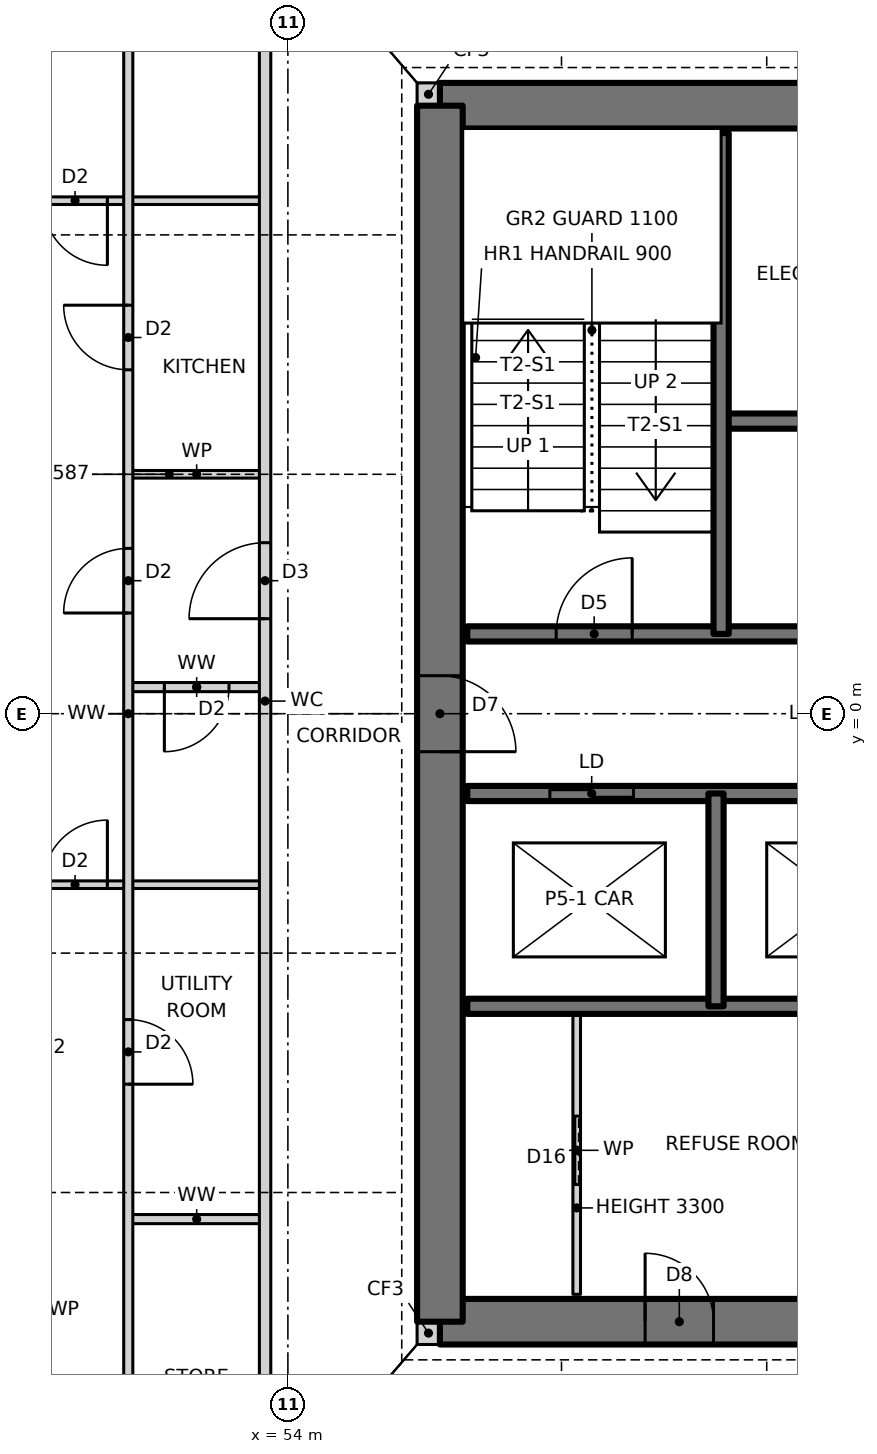
"""IFC4 building model, lengths in metres.
Left out: names, types, materials, properties, quantities, classifications, styles, units other than length and angle.
Written with IfcOpenShell. Run it as: python <this file> out.ifc"""

import sys

from ifc_helpers import new_model, si_unit, direction, frame, frame_2d, origin, place, context, subcontext, project, spatial, rectangle, extrude, element, fill, save


model = new_model("IFC4")
c1 = context("Model", 3, precision=1e-05, world=origin(), true_north=direction((0.0, 1.0)))
c2 = subcontext(c1, "Body", "Model", "MODEL_VIEW")
j1 = project(units=[si_unit("LENGTHUNIT", "METRE"), si_unit("PLANEANGLEUNIT", "RADIAN")], contexts=[c1])
p1 = place(None, origin())
s1 = spatial("IfcSite", under=j1, at=p1, CompositionType="ELEMENT")
p2 = place(p1, origin())
s2 = spatial("IfcBuilding", under=s1, at=p2, CompositionType="ELEMENT")
p3 = place(p2, frame((0.0, 0.0, 39.5)))
s3 = spatial("IfcBuildingStorey", under=s2, at=p3, CompositionType="ELEMENT", Elevation=39.5)
for number, where, z_axis, x_axis in (
    (1, (55.7, -8.15, 0.0), (0.0, 0.0, 1.0), (1.0, 0.0, 0.0)),
    (2, (55.7, 8.15, 0.0), (0.0, 0.0, 1.0), (1.0, 0.0, 0.0)),
):
    element("IfcWall", number, at=place(p3, frame(where, z_axis=z_axis, x_axis=x_axis)), inside=s3, PredefinedType="SOLIDWALL", context=c2, shape_type="SweptSolid", body=[
        extrude(rectangle(XDim=0.3, YDim=0.3, at=frame_2d((0.15, 0.0))), origin(), (0.0, 0.0, 1.0), 3.5),
    ])
p4 = place(p3, frame((56.0, -8.0, 0.0), z_axis=(0.0, 0.0, 1.0), x_axis=(1.0, 0.0, 0.0)))
e3 = element("IfcWall", 3, at=p4, inside=s3, PredefinedType="SHEAR", context=c2, shape_type="SweptSolid", body=[
    extrude(rectangle(XDim=14.0, YDim=0.6, at=frame_2d((7.0, 0.0))), origin(), (0.0, 0.0, 1.0), 3.5),
])
p5 = place(p4, frame((2.7, 0.0, 0.0)))
e4 = element("IfcOpeningElement", 4, at=p5, cuts=e3, PredefinedType="OPENING", context=c2, shape_type="SweptSolid", body=[
    extrude(rectangle(XDim=0.9, YDim=2.1, at=frame_2d((0.45, 1.05))), frame((0.0, 0.31, 0.0), z_axis=(0.0, -1.0, 0.0), x_axis=(1.0, 0.0, 0.0)), (0.0, 0.0, 1.0), 0.62),
])
p6 = place(p4, frame((7.7, 0.0, 0.0)))
e5 = element("IfcOpeningElement", 5, at=p6, cuts=e3, PredefinedType="OPENING", context=c2, shape_type="SweptSolid", body=[
    extrude(rectangle(XDim=0.9, YDim=2.1, at=frame_2d((0.45, 1.05))), frame((0.0, 0.31, 0.0), z_axis=(0.0, -1.0, 0.0), x_axis=(1.0, 0.0, 0.0)), (0.0, 0.0, 1.0), 0.62),
])
p7 = place(p3, frame((70.0, 8.0, 0.0), z_axis=(0.0, 0.0, 1.0), x_axis=(-1.0, 0.0, 0.0)))
e6 = element("IfcWall", 6, at=p7, inside=s3, PredefinedType="SHEAR", context=c2, shape_type="SweptSolid", body=[
    extrude(rectangle(XDim=14.0, YDim=0.6, at=frame_2d((7.0, 0.0))), origin(), (0.0, 0.0, 1.0), 3.5),
])
p8 = place(p7, frame((8.2, 0.0, 0.0)))
e7 = element("IfcOpeningElement", 7, at=p8, cuts=e6, PredefinedType="OPENING", context=c2, shape_type="SweptSolid", body=[
    extrude(rectangle(XDim=0.9, YDim=2.1, at=frame_2d((0.45, 1.05))), frame((0.0, 0.31, 0.0), z_axis=(0.0, -1.0, 0.0), x_axis=(1.0, 0.0, 0.0)), (0.0, 0.0, 1.0), 0.62),
])
p9 = place(p7, frame((3.2, 0.0, 0.0)))
e8 = element("IfcOpeningElement", 8, at=p9, cuts=e6, PredefinedType="OPENING", context=c2, shape_type="SweptSolid", body=[
    extrude(rectangle(XDim=0.9, YDim=2.1, at=frame_2d((0.45, 1.05))), frame((0.0, 0.31, 0.0), z_axis=(0.0, -1.0, 0.0), x_axis=(1.0, 0.0, 0.0)), (0.0, 0.0, 1.0), 0.62),
])
p10 = place(p3, frame((56.0, 8.0, 0.0), z_axis=(0.0, 0.0, 1.0), x_axis=(0.0, -1.0, 0.0)))
e9 = element("IfcWall", 9, at=p10, inside=s3, PredefinedType="SHEAR", context=c2, shape_type="SweptSolid", body=[
    extrude(rectangle(XDim=16.0, YDim=0.6, at=frame_2d((8.0, 0.0))), origin(), (0.0, 0.0, 1.0), 3.5),
])
p11 = place(p10, frame((7.5, 0.0, 0.0)))
e10 = element("IfcOpeningElement", 10, at=p11, cuts=e9, PredefinedType="OPENING", context=c2, shape_type="SweptSolid", body=[
    extrude(rectangle(XDim=1.0, YDim=2.1, at=frame_2d((0.5, 1.05))), frame((0.0, 0.31, 0.0), z_axis=(0.0, -1.0, 0.0), x_axis=(1.0, 0.0, 0.0)), (0.0, 0.0, 1.0), 0.62),
])
p12 = place(p3, frame((51.9, -6.65, 0.0), z_axis=(0.0, 0.0, 1.0), x_axis=(1.0, 0.0, 0.0)))
e11 = element("IfcWall", 11, at=p12, inside=s3, PredefinedType="PARTITIONING", context=c2, shape_type="SweptSolid", body=[
    extrude(rectangle(XDim=1.8, YDim=0.12, at=frame_2d((0.9, 0.0))), origin(), (0.0, 0.0, 1.0), 3.27),
])
p13 = place(p3, frame((56.36, -3.85, 0.0), z_axis=(0.0, 0.0, 1.0), x_axis=(1.0, 0.0, 0.0)))
e12 = element("IfcWall", 12, at=p13, inside=s3, PredefinedType="SOLIDWALL", context=c2, shape_type="SweptSolid", body=[
    extrude(rectangle(XDim=9.94, YDim=0.2, at=frame_2d((4.97, 0.0))), origin(), (0.0, 0.0, 1.0), 3.5),
])
p14 = place(p3, frame((46.56, -2.25, 0.0), z_axis=(0.0, 0.0, 1.0), x_axis=(1.0, 0.0, 0.0)))
e13 = element("IfcWall", 13, at=p14, inside=s3, PredefinedType="PARTITIONING", context=c2, shape_type="SweptSolid", body=[
    extrude(rectangle(XDim=7.14, YDim=0.1, at=frame_2d((3.57, 0.0))), origin(), (0.0, 0.0, 1.0), 3.27),
])
p15 = place(p14, frame((4.215, 0.0, 0.0)))
e14 = element("IfcOpeningElement", 14, at=p15, cuts=e13, PredefinedType="OPENING", context=c2, shape_type="SweptSolid", body=[
    extrude(rectangle(XDim=0.85, YDim=2.1, at=frame_2d((0.425, 1.05))), frame((0.0, 0.06, 0.0), z_axis=(0.0, -1.0, 0.0), x_axis=(1.0, 0.0, 0.0)), (0.0, 0.0, 1.0), 0.12),
])
p16 = place(p3, frame((56.36, -1.05, 0.0), z_axis=(0.0, 0.0, 1.0), x_axis=(1.0, 0.0, 0.0)))
e15 = element("IfcWall", 15, at=p16, inside=s3, PredefinedType="SOLIDWALL", context=c2, shape_type="SweptSolid", body=[
    extrude(rectangle(XDim=13.28, YDim=0.2, at=frame_2d((6.64, 0.0))), origin(), (0.0, 0.0, 1.0), 3.5),
])
p17 = place(p16, frame((11.11, 0.0, 0.0)))
e16 = element("IfcOpeningElement", 16, at=p17, cuts=e15, PredefinedType="OPENING", context=c2, shape_type="SweptSolid", body=[
    extrude(rectangle(XDim=1.0, YDim=2.1, at=frame_2d((0.5, 1.05))), frame((0.0, 0.11, 0.0), z_axis=(0.0, -1.0, 0.0), x_axis=(1.0, 0.0, 0.0)), (0.0, 0.0, 1.0), 0.22),
])
p18 = place(p16, frame((1.087, 0.0, 0.0)))
e17 = element("IfcOpeningElement", 17, at=p18, cuts=e15, PredefinedType="OPENING", context=c2, shape_type="SweptSolid", body=[
    extrude(rectangle(XDim=1.1, YDim=2.1, at=frame_2d((0.55, 1.05))), frame((0.0, 0.11, 0.0), z_axis=(0.0, -1.0, 0.0), x_axis=(1.0, 0.0, 0.0)), (0.0, 0.0, 1.0), 0.22),
])
p19 = place(p16, frame((4.39, 0.0, 0.0)))
e18 = element("IfcOpeningElement", 18, at=p19, cuts=e15, PredefinedType="OPENING", context=c2, shape_type="SweptSolid", body=[
    extrude(rectangle(XDim=1.1, YDim=2.1, at=frame_2d((0.55, 1.05))), frame((0.0, 0.11, 0.0), z_axis=(0.0, -1.0, 0.0), x_axis=(1.0, 0.0, 0.0)), (0.0, 0.0, 1.0), 0.22),
])
p20 = place(p16, frame((7.724, 0.0, 0.0)))
e19 = element("IfcOpeningElement", 19, at=p20, cuts=e15, PredefinedType="OPENING", context=c2, shape_type="SweptSolid", body=[
    extrude(rectangle(XDim=1.1, YDim=2.1, at=frame_2d((0.55, 1.05))), frame((0.0, 0.11, 0.0), z_axis=(0.0, -1.0, 0.0), x_axis=(1.0, 0.0, 0.0)), (0.0, 0.0, 1.0), 0.22),
])
p21 = place(p3, frame((51.9, 0.35, 0.0), z_axis=(0.0, 0.0, 1.0), x_axis=(1.0, 0.0, 0.0)))
e20 = element("IfcWall", 20, at=p21, inside=s3, PredefinedType="PARTITIONING", context=c2, shape_type="SweptSolid", body=[
    extrude(rectangle(XDim=1.8, YDim=0.12, at=frame_2d((0.9, 0.0))), origin(), (0.0, 0.0, 1.0), 3.27),
])
p22 = place(p21, frame((0.475, 0.0, 0.0)))
e21 = element("IfcOpeningElement", 21, at=p22, cuts=e20, PredefinedType="OPENING", context=c2, shape_type="SweptSolid", body=[
    extrude(rectangle(XDim=0.85, YDim=2.1, at=frame_2d((0.425, 1.05))), frame((0.0, 0.07, 0.0), z_axis=(0.0, -1.0, 0.0), x_axis=(1.0, 0.0, 0.0)), (0.0, 0.0, 1.0), 0.14),
])
p23 = place(p3, frame((56.36, 1.05, 0.0), z_axis=(0.0, 0.0, 1.0), x_axis=(1.0, 0.0, 0.0)))
e22 = element("IfcWall", 22, at=p23, inside=s3, PredefinedType="SOLIDWALL", context=c2, shape_type="SweptSolid", body=[
    extrude(rectangle(XDim=13.28, YDim=0.2, at=frame_2d((6.64, 0.0))), origin(), (0.0, 0.0, 1.0), 3.5),
])
p24 = place(p23, frame((1.17, 0.0, 0.0)))
e23 = element("IfcOpeningElement", 23, at=p24, cuts=e22, PredefinedType="OPENING", context=c2, shape_type="SweptSolid", body=[
    extrude(rectangle(XDim=1.0, YDim=2.1, at=frame_2d((0.5, 1.05))), frame((0.0, 0.11, 0.0), z_axis=(0.0, -1.0, 0.0), x_axis=(1.0, 0.0, 0.0)), (0.0, 0.0, 1.0), 0.22),
])
p25 = place(p23, frame((6.19, 0.0, 0.0)))
e24 = element("IfcOpeningElement", 24, at=p25, cuts=e22, PredefinedType="OPENING", context=c2, shape_type="SweptSolid", body=[
    extrude(rectangle(XDim=0.9, YDim=2.1, at=frame_2d((0.45, 1.05))), frame((0.0, 0.11, 0.0), z_axis=(0.0, -1.0, 0.0), x_axis=(1.0, 0.0, 0.0)), (0.0, 0.0, 1.0), 0.22),
])
p26 = place(p23, frame((10.96, 0.0, 0.0)))
e25 = element("IfcOpeningElement", 25, at=p26, cuts=e22, PredefinedType="OPENING", context=c2, shape_type="SweptSolid", body=[
    extrude(rectangle(XDim=1.3, YDim=2.1, at=frame_2d((0.65, 1.05))), frame((0.0, 0.11, 0.0), z_axis=(0.0, -1.0, 0.0), x_axis=(1.0, 0.0, 0.0)), (0.0, 0.0, 1.0), 0.22),
])
p27 = place(p3, frame((51.9, 3.15, 0.0), z_axis=(0.0, 0.0, 1.0), x_axis=(1.0, 0.0, 0.0)))
e26 = element("IfcWall", 26, at=p27, inside=s3, PredefinedType="PARTITIONING", context=c2, shape_type="SweptSolid", body=[
    extrude(rectangle(XDim=1.8, YDim=0.1, at=frame_2d((0.9, 0.0))), origin(), (0.0, 0.0, 1.0), 2.587),
])
p28 = place(p3, frame((59.7, 3.85, 0.0), z_axis=(0.0, 0.0, 1.0), x_axis=(1.0, 0.0, 0.0)))
e27 = element("IfcWall", 27, at=p28, inside=s3, PredefinedType="SOLIDWALL", context=c2, shape_type="SweptSolid", body=[
    extrude(rectangle(XDim=9.94, YDim=0.2, at=frame_2d((4.97, 0.0))), origin(), (0.0, 0.0, 1.0), 3.5),
])
p29 = place(p3, frame((46.56, 6.75, 0.0), z_axis=(0.0, 0.0, 1.0), x_axis=(1.0, 0.0, 0.0)))
e28 = element("IfcWall", 28, at=p29, inside=s3, PredefinedType="PARTITIONING", context=c2, shape_type="SweptSolid", body=[
    extrude(rectangle(XDim=7.14, YDim=0.1, at=frame_2d((3.57, 0.0))), origin(), (0.0, 0.0, 1.0), 3.27),
])
p30 = place(p29, frame((4.215, 0.0, 0.0)))
e29 = element("IfcOpeningElement", 29, at=p30, cuts=e28, PredefinedType="OPENING", context=c2, shape_type="SweptSolid", body=[
    extrude(rectangle(XDim=0.85, YDim=2.1, at=frame_2d((0.425, 1.05))), frame((0.0, 0.06, 0.0), z_axis=(0.0, -1.0, 0.0), x_axis=(1.0, 0.0, 0.0)), (0.0, 0.0, 1.0), 0.12),
])
p31 = place(p3, frame((59.7, 1.05, 0.0), z_axis=(0.0, 0.0, 1.0), x_axis=(0.0, 1.0, 0.0)))
e30 = element("IfcWall", 30, at=p31, inside=s3, PredefinedType="SOLIDWALL", context=c2, shape_type="SweptSolid", body=[
    extrude(rectangle(XDim=6.59, YDim=0.2, at=frame_2d((3.295, 0.0))), origin(), (0.0, 0.0, 1.0), 3.5),
])
p32 = place(p3, frame((59.633, -3.85, 0.0), z_axis=(0.0, 0.0, 1.0), x_axis=(0.0, 1.0, 0.0)))
e31 = element("IfcWall", 31, at=p32, inside=s3, PredefinedType="SOLIDWALL", context=c2, shape_type="SweptSolid", body=[
    extrude(rectangle(XDim=2.8, YDim=0.2, at=frame_2d((1.4, 0.0))), origin(), (0.0, 0.0, 1.0), 3.5),
])
p33 = place(p3, frame((57.8, -7.64, 0.0), z_axis=(0.0, 0.0, 1.0), x_axis=(0.0, 1.0, 0.0)))
e32 = element("IfcWall", 32, at=p33, inside=s3, PredefinedType="PARTITIONING", context=c2, shape_type="SweptSolid", body=[
    extrude(rectangle(XDim=3.79, YDim=0.1, at=frame_2d((1.895, 0.0))), origin(), (0.0, 0.0, 1.0), 3.3),
])
p34 = place(p33, frame((1.445, 0.0, 0.0)))
e33 = element("IfcOpeningElement", 33, at=p34, cuts=e32, PredefinedType="OPENING", context=c2, shape_type="SweptSolid", body=[
    extrude(rectangle(XDim=0.9, YDim=2.1, at=frame_2d((0.45, 1.05))), frame((0.0, 0.06, 0.0), z_axis=(0.0, -1.0, 0.0), x_axis=(1.0, 0.0, 0.0)), (0.0, 0.0, 1.0), 0.12),
])
p35 = place(p3, frame((53.7, -10.568, 0.0), z_axis=(0.0, 0.0, 1.0), x_axis=(0.0, 1.0, 0.0)))
e34 = element("IfcWall", 34, at=p35, inside=s3, PredefinedType="PARTITIONING", context=c2, shape_type="SweptSolid", body=[
    extrude(rectangle(XDim=21.468, YDim=0.15, at=frame_2d((10.734, 0.0))), origin(), (0.0, 0.0, 1.0), 3.27),
])
p36 = place(p35, frame((11.818, 0.0, 0.0)))
e35 = element("IfcOpeningElement", 35, at=p36, cuts=e34, PredefinedType="OPENING", context=c2, shape_type="SweptSolid", body=[
    extrude(rectangle(XDim=1.0, YDim=2.1, at=frame_2d((0.5, 1.05))), frame((0.0, 0.085, 0.0), z_axis=(0.0, -1.0, 0.0), x_axis=(1.0, 0.0, 0.0)), (0.0, 0.0, 1.0), 0.17),
])
p37 = place(p3, frame((51.9, -12.614, 0.0), z_axis=(0.0, 0.0, 1.0), x_axis=(0.0, 1.0, 0.0)))
e36 = element("IfcWall", 36, at=p37, inside=s3, PredefinedType="PARTITIONING", context=c2, shape_type="SweptSolid", body=[
    extrude(rectangle(XDim=25.228, YDim=0.12, at=frame_2d((12.614, 0.0))), origin(), (0.0, 0.0, 1.0), 3.27),
])
p38 = place(p37, frame((17.139, 0.0, 0.0)))
e37 = element("IfcOpeningElement", 37, at=p38, cuts=e36, PredefinedType="OPENING", context=c2, shape_type="SweptSolid", body=[
    extrude(rectangle(XDim=0.85, YDim=2.1, at=frame_2d((0.425, 1.05))), frame((0.0, 0.07, 0.0), z_axis=(0.0, -1.0, 0.0), x_axis=(1.0, 0.0, 0.0)), (0.0, 0.0, 1.0), 0.14),
])
p39 = place(p37, frame((13.939, 0.0, 0.0)))
e38 = element("IfcOpeningElement", 38, at=p39, cuts=e36, PredefinedType="OPENING", context=c2, shape_type="SweptSolid", body=[
    extrude(rectangle(XDim=0.85, YDim=2.1, at=frame_2d((0.425, 1.05))), frame((0.0, 0.07, 0.0), z_axis=(0.0, -1.0, 0.0), x_axis=(1.0, 0.0, 0.0)), (0.0, 0.0, 1.0), 0.14),
])
p40 = place(p37, frame((21.871, 0.0, 0.0)))
e39 = element("IfcOpeningElement", 39, at=p40, cuts=e36, PredefinedType="OPENING", context=c2, shape_type="SweptSolid", body=[
    extrude(rectangle(XDim=0.85, YDim=2.1, at=frame_2d((0.425, 1.05))), frame((0.0, 0.07, 0.0), z_axis=(0.0, -1.0, 0.0), x_axis=(1.0, 0.0, 0.0)), (0.0, 0.0, 1.0), 0.14),
])
p41 = place(p37, frame((7.739, 0.0, 0.0)))
e40 = element("IfcOpeningElement", 40, at=p41, cuts=e36, PredefinedType="OPENING", context=c2, shape_type="SweptSolid", body=[
    extrude(rectangle(XDim=0.85, YDim=2.1, at=frame_2d((0.425, 1.05))), frame((0.0, 0.07, 0.0), z_axis=(0.0, -1.0, 0.0), x_axis=(1.0, 0.0, 0.0)), (0.0, 0.0, 1.0), 0.14),
])
p42 = place(p37, frame((2.557, 0.0, 0.0)))
e41 = element("IfcOpeningElement", 41, at=p42, cuts=e36, PredefinedType="OPENING", context=c2, shape_type="SweptSolid", body=[
    extrude(rectangle(XDim=0.85, YDim=2.1, at=frame_2d((0.425, 1.05))), frame((0.0, 0.07, 0.0), z_axis=(0.0, -1.0, 0.0), x_axis=(1.0, 0.0, 0.0)), (0.0, 0.0, 1.0), 0.14),
])
p43 = place(p24, origin())
e42 = element("IfcDoor", 42, at=p43, inside=s3, OperationType="SINGLE_SWING_RIGHT", PredefinedType="DOOR", context=c2, shape_type="SweptSolid", body=[
    extrude(rectangle(XDim=1.0, YDim=2.1, at=frame_2d((0.5, 1.05))), frame((0.0, 0.025, 0.0), z_axis=(0.0, -1.0, 0.0), x_axis=(1.0, 0.0, 0.0)), (0.0, 0.0, 1.0), 0.05),
])
fill(e23, e42)
p44 = place(p34, origin())
e43 = element("IfcDoor", 43, at=p44, inside=s3, OperationType="SLIDING_TO_LEFT", PredefinedType="DOOR", context=c2, shape_type="SweptSolid", body=[
    extrude(rectangle(XDim=0.9, YDim=2.1, at=frame_2d((0.45, 1.05))), frame((0.0, 0.025, 0.0), z_axis=(0.0, -1.0, 0.0), x_axis=(1.0, 0.0, 0.0)), (0.0, 0.0, 1.0), 0.05),
])
fill(e33, e43)
p45 = place(p38, origin())
e44 = element("IfcDoor", 44, at=p45, inside=s3, OperationType="SINGLE_SWING_RIGHT", PredefinedType="DOOR", context=c2, shape_type="SweptSolid", body=[
    extrude(rectangle(XDim=0.85, YDim=2.1, at=frame_2d((0.425, 1.05))), frame((0.0, 0.025, 0.0), z_axis=(0.0, -1.0, 0.0), x_axis=(1.0, 0.0, 0.0)), (0.0, 0.0, 1.0), 0.05),
])
fill(e37, e44)
p46 = place(p36, origin())
e45 = element("IfcDoor", 45, at=p46, inside=s3, OperationType="SINGLE_SWING_LEFT", PredefinedType="DOOR", context=c2, shape_type="SweptSolid", body=[
    extrude(rectangle(XDim=1.0, YDim=2.1, at=frame_2d((0.5, 1.05))), frame((0.0, 0.025, 0.0), z_axis=(0.0, -1.0, 0.0), x_axis=(1.0, 0.0, 0.0)), (0.0, 0.0, 1.0), 0.05),
])
fill(e35, e45)
p47 = place(p39, origin())
e46 = element("IfcDoor", 46, at=p47, inside=s3, OperationType="SINGLE_SWING_LEFT", PredefinedType="DOOR", context=c2, shape_type="SweptSolid", body=[
    extrude(rectangle(XDim=0.85, YDim=2.1, at=frame_2d((0.425, 1.05))), frame((0.0, 0.025, 0.0), z_axis=(0.0, -1.0, 0.0), x_axis=(1.0, 0.0, 0.0)), (0.0, 0.0, 1.0), 0.05),
])
fill(e38, e46)
p48 = place(p22, frame((0.85, 0.0, 0.0), z_axis=(0.0, 0.0, 1.0), x_axis=(-1.0, 0.0, 0.0)))
e47 = element("IfcDoor", 47, at=p48, inside=s3, OperationType="SINGLE_SWING_RIGHT", PredefinedType="DOOR", context=c2, shape_type="SweptSolid", body=[
    extrude(rectangle(XDim=0.85, YDim=2.1, at=frame_2d((0.425, 1.05))), frame((0.0, 0.025, 0.0), z_axis=(0.0, -1.0, 0.0), x_axis=(1.0, 0.0, 0.0)), (0.0, 0.0, 1.0), 0.05),
])
fill(e21, e47)
p49 = place(p30, frame((0.85, 0.0, 0.0), z_axis=(0.0, 0.0, 1.0), x_axis=(-1.0, 0.0, 0.0)))
e48 = element("IfcDoor", 48, at=p49, inside=s3, OperationType="SINGLE_SWING_LEFT", PredefinedType="DOOR", context=c2, shape_type="SweptSolid", body=[
    extrude(rectangle(XDim=0.85, YDim=2.1, at=frame_2d((0.425, 1.05))), frame((0.0, 0.025, 0.0), z_axis=(0.0, -1.0, 0.0), x_axis=(1.0, 0.0, 0.0)), (0.0, 0.0, 1.0), 0.05),
])
fill(e29, e48)
p50 = place(p15, origin())
e49 = element("IfcDoor", 49, at=p50, inside=s3, OperationType="SINGLE_SWING_RIGHT", PredefinedType="DOOR", context=c2, shape_type="SweptSolid", body=[
    extrude(rectangle(XDim=0.85, YDim=2.1, at=frame_2d((0.425, 1.05))), frame((0.0, 0.025, 0.0), z_axis=(0.0, -1.0, 0.0), x_axis=(1.0, 0.0, 0.0)), (0.0, 0.0, 1.0), 0.05),
])
fill(e14, e49)
p51 = place(p41, frame((0.85, 0.0, 0.0), z_axis=(0.0, 0.0, 1.0), x_axis=(-1.0, 0.0, 0.0)))
e50 = element("IfcDoor", 50, at=p51, inside=s3, OperationType="SINGLE_SWING_RIGHT", PredefinedType="DOOR", context=c2, shape_type="SweptSolid", body=[
    extrude(rectangle(XDim=0.85, YDim=2.1, at=frame_2d((0.425, 1.05))), frame((0.0, 0.025, 0.0), z_axis=(0.0, -1.0, 0.0), x_axis=(1.0, 0.0, 0.0)), (0.0, 0.0, 1.0), 0.05),
])
fill(e40, e50)
p52 = place(p11, origin())
e51 = element("IfcDoor", 51, at=p52, inside=s3, OperationType="SINGLE_SWING_RIGHT", PredefinedType="DOOR", context=c2, shape_type="SweptSolid", body=[
    extrude(rectangle(XDim=1.0, YDim=2.1, at=frame_2d((0.5, 1.05))), frame((0.0, 0.025, 0.0), z_axis=(0.0, -1.0, 0.0), x_axis=(1.0, 0.0, 0.0)), (0.0, 0.0, 1.0), 0.05),
])
fill(e10, e51)
p53 = place(p5, origin())
e52 = element("IfcDoor", 52, at=p53, inside=s3, OperationType="SINGLE_SWING_LEFT", PredefinedType="DOOR", context=c2, shape_type="SweptSolid", body=[
    extrude(rectangle(XDim=0.9, YDim=2.1, at=frame_2d((0.45, 1.05))), frame((0.0, 0.025, 0.0), z_axis=(0.0, -1.0, 0.0), x_axis=(1.0, 0.0, 0.0)), (0.0, 0.0, 1.0), 0.05),
])
fill(e4, e52)
p54 = place(p18, origin())
e53 = element("IfcDoor", 53, at=p54, inside=s3, OperationType="DOUBLE_DOOR_SLIDING", PredefinedType="DOOR", context=c2, shape_type="SweptSolid", body=[
    extrude(rectangle(XDim=1.1, YDim=2.1, at=frame_2d((0.55, 1.05))), frame((0.0, 0.025, 0.0), z_axis=(0.0, -1.0, 0.0), x_axis=(1.0, 0.0, 0.0)), (0.0, 0.0, 1.0), 0.05),
])
fill(e17, e53)
save(model, sys.argv[1])
